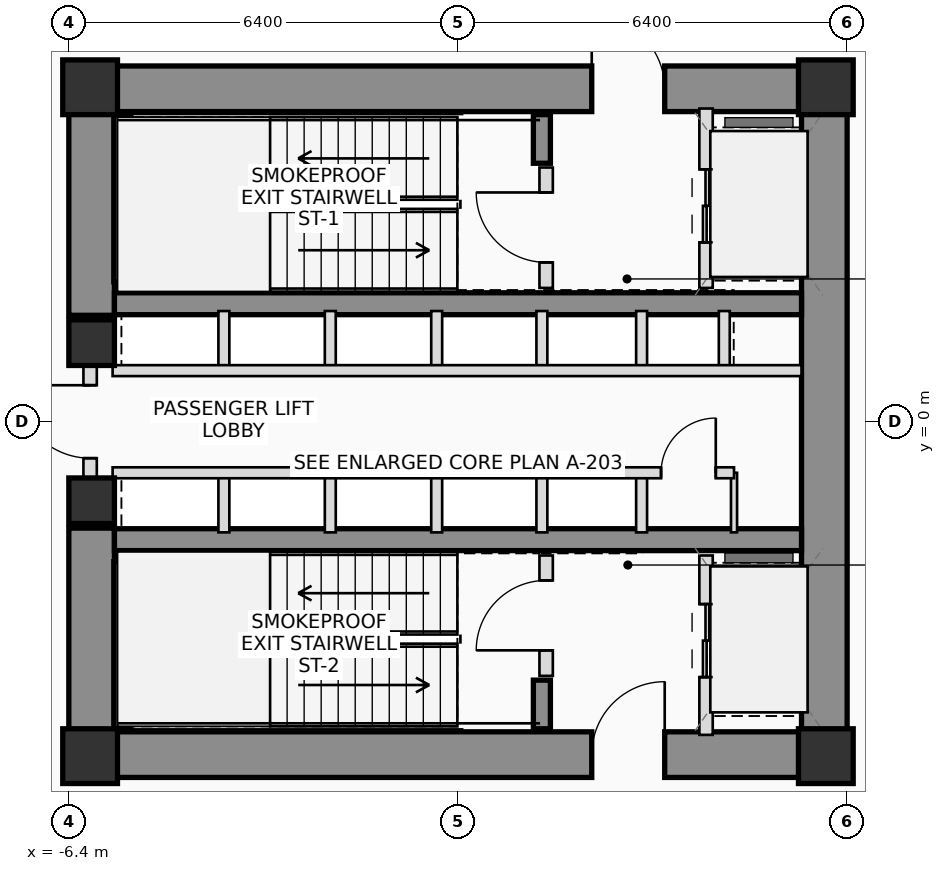
"""IFC4 building model, lengths in metres.
Left out: names, types, materials, properties, quantities, classifications, styles, units other than length and angle.
Written with IfcOpenShell. Run it as: python <this file> out.ifc"""

import sys

from ifc_helpers import new_model, si_unit, direction, frame, frame_2d, origin, origin_2d, place, context, subcontext, project, spatial, rectangle, extrude, source, transform, mapped, element, fill, save


model = new_model("IFC4")
c1 = context("Model", 3, precision=1e-05, world=origin(), true_north=direction((0.0, 1.0)))
c2 = subcontext(c1, "Body", "Model", "MODEL_VIEW")
j1 = project(units=[si_unit("LENGTHUNIT", "METRE"), si_unit("PLANEANGLEUNIT", "RADIAN")], contexts=[c1])
p1 = place(None, origin())
s1 = spatial("IfcSite", under=j1, at=p1, CompositionType="ELEMENT")
p2 = place(p1, origin())
s2 = spatial("IfcBuilding", under=s1, at=p2, CompositionType="ELEMENT")
p3 = place(p2, frame((0.0, 0.0, 4.5)))
s3 = spatial("IfcBuildingStorey", under=s2, at=p3, CompositionType="ELEMENT", Elevation=4.5)
m1 = source(origin(), c2, "Body", "SweptSolid", [
    extrude(rectangle(XDim=0.9, YDim=0.9, at=origin_2d()), origin(), (0.0, 0.0, 1.0), 3.9),
])
for number, where, z_axis, x_axis in (
    (1, (-6.05, -5.5, 0.0), (0.0, 0.0, 1.0), (1.0, 0.0, 0.0)),
    (2, (6.05, -5.5, 0.0), (0.0, 0.0, 1.0), (1.0, 0.0, 0.0)),
    (3, (6.05, 5.5, 0.0), (0.0, 0.0, 1.0), (1.0, 0.0, 0.0)),
    (4, (-6.05, 5.5, 0.0), (0.0, 0.0, 1.0), (1.0, 0.0, 0.0)),
):
    element("IfcColumn", number, at=place(p3, frame(where, z_axis=z_axis, x_axis=x_axis)), inside=s3, PredefinedType="COLUMN", context=c2, shape_type="MappedRepresentation", body=[
        mapped(m1, transform((0.0, 0.0, 0.0), scale=1.0)),
    ])
p4 = place(p3, frame((-6.4, 5.475, 0.0), z_axis=(0.0, 0.0, 1.0), x_axis=(1.0, 0.0, 0.0)))
e5 = element("IfcWall", 5, at=p4, inside=s3, PredefinedType="SHEAR", context=c2, shape_type="SweptSolid", body=[
    extrude(rectangle(XDim=12.8, YDim=0.75, at=frame_2d((6.4, 0.0))), origin(), (0.0, 0.0, 1.0), 3.9),
])
p5 = place(p4, frame((8.6, 0.0, 0.0)))
e6 = element("IfcOpeningElement", 6, at=p5, cuts=e5, PredefinedType="OPENING", context=c2, shape_type="SweptSolid", body=[
    extrude(rectangle(XDim=1.2, YDim=2.2, at=frame_2d((0.6, 1.1))), frame((0.0, 0.385, 0.0), z_axis=(0.0, -1.0, 0.0), x_axis=(1.0, 0.0, 0.0)), (0.0, 0.0, 1.0), 0.77),
])
p6 = place(p3, frame((-6.4, -5.475, 0.0), z_axis=(0.0, 0.0, 1.0), x_axis=(1.0, 0.0, 0.0)))
e7 = element("IfcWall", 7, at=p6, inside=s3, PredefinedType="SHEAR", context=c2, shape_type="SweptSolid", body=[
    extrude(rectangle(XDim=12.8, YDim=0.75, at=frame_2d((6.4, 0.0))), origin(), (0.0, 0.0, 1.0), 3.9),
])
p7 = place(p6, frame((8.6, 0.0, 0.0)))
e8 = element("IfcOpeningElement", 8, at=p7, cuts=e7, PredefinedType="OPENING", context=c2, shape_type="SweptSolid", body=[
    extrude(rectangle(XDim=1.2, YDim=2.2, at=frame_2d((0.6, 1.1))), frame((0.0, 0.385, 0.0), z_axis=(0.0, -1.0, 0.0), x_axis=(1.0, 0.0, 0.0)), (0.0, 0.0, 1.0), 0.77),
])
p8 = place(p3, frame((6.025, -5.1, 0.0), z_axis=(0.0, 0.0, 1.0), x_axis=(0.0, 1.0, 0.0)))
e9 = element("IfcWall", 9, at=p8, inside=s3, PredefinedType="SHEAR", context=c2, shape_type="SweptSolid", body=[
    extrude(rectangle(XDim=10.2, YDim=0.75, at=frame_2d((5.1, 0.0))), origin(), (0.0, 0.0, 1.0), 3.9),
])
for number, where, z_axis, x_axis in (
    (10, (-6.025, -5.1, 0.0), (0.0, 0.0, 1.0), (0.0, 1.0, 0.0)),
    (11, (-6.025, 1.75, 0.0), (0.0, 0.0, 1.0), (0.0, 1.0, 0.0)),
):
    element("IfcWall", number, at=place(p3, frame(where, z_axis=z_axis, x_axis=x_axis)), inside=s3, PredefinedType="SHEAR", context=c2, shape_type="SweptSolid", body=[
        extrude(rectangle(XDim=3.35, YDim=0.75, at=frame_2d((1.675, 0.0))), origin(), (0.0, 0.0, 1.0), 3.9),
    ])
for number, where, z_axis, x_axis in (
    (12, (-5.65, 1.94, 0.0), (0.0, 0.0, 1.0), (1.0, 0.0, 0.0)),
    (13, (-5.65, -1.94, 0.0), (0.0, 0.0, 1.0), (1.0, 0.0, 0.0)),
):
    element("IfcWall", number, at=place(p3, frame(where, z_axis=z_axis, x_axis=x_axis)), inside=s3, PredefinedType="SHEAR", context=c2, shape_type="SweptSolid", body=[
        extrude(rectangle(XDim=11.3, YDim=0.36, at=frame_2d((5.65, 0.0))), origin(), (0.0, 0.0, 1.0), 3.9),
    ])
p9 = place(p3, frame((-5.52, 2.3, 0.0), z_axis=(0.0, 0.0, 1.0), x_axis=(0.0, 1.0, 0.0)))
e14 = element("IfcWall", 14, at=p9, inside=s3, PredefinedType="SHEAR", context=c2, shape_type="SweptSolid", body=[
    extrude(rectangle(XDim=2.75, YDim=0.28, at=frame_2d((1.375, 0.0))), origin(), (0.0, 0.0, 1.0), 3.9),
])
p10 = place(p3, frame((1.38, 4.25, 0.0), z_axis=(0.0, 0.0, 1.0), x_axis=(0.0, 1.0, 0.0)))
e15 = element("IfcWall", 15, at=p10, inside=s3, PredefinedType="SHEAR", context=c2, shape_type="SweptSolid", body=[
    extrude(rectangle(XDim=0.8, YDim=0.28, at=frame_2d((0.4, 0.0))), origin(), (0.0, 0.0, 1.0), 3.9),
])
p11 = place(p3, frame((-5.52, -5.05, 0.0), z_axis=(0.0, 0.0, 1.0), x_axis=(0.0, 1.0, 0.0)))
e16 = element("IfcWall", 16, at=p11, inside=s3, PredefinedType="SHEAR", context=c2, shape_type="SweptSolid", body=[
    extrude(rectangle(XDim=2.75, YDim=0.28, at=frame_2d((1.375, 0.0))), origin(), (0.0, 0.0, 1.0), 3.9),
])
p12 = place(p3, frame((1.38, -5.05, 0.0), z_axis=(0.0, 0.0, 1.0), x_axis=(0.0, 1.0, 0.0)))
e17 = element("IfcWall", 17, at=p12, inside=s3, PredefinedType="SHEAR", context=c2, shape_type="SweptSolid", body=[
    extrude(rectangle(XDim=0.8, YDim=0.28, at=frame_2d((0.4, 0.0))), origin(), (0.0, 0.0, 1.0), 3.9),
])
m2 = source(origin(), c2, "Body", "SweptSolid", [
    extrude(rectangle(XDim=0.75, YDim=0.75, at=origin_2d()), origin(), (0.0, 0.0, 1.0), 3.9),
])
for number, where, z_axis, x_axis in (
    (18, (-6.025, -1.3, 0.0), (0.0, 0.0, 1.0), (1.0, 0.0, 0.0)),
    (19, (-6.025, 1.3, 0.0), (0.0, 0.0, 1.0), (1.0, 0.0, 0.0)),
):
    element("IfcColumn", number, at=place(p3, frame(where, z_axis=z_axis, x_axis=x_axis)), inside=s3, PredefinedType="COLUMN", context=c2, shape_type="MappedRepresentation", body=[
        mapped(m2, transform((0.0, 0.0, 0.0), scale=1.0)),
    ])
p13 = place(p3, frame((-6.05, -0.95, 0.0), z_axis=(0.0, 0.0, 1.0), x_axis=(0.0, 1.0, 0.0)))
e20 = element("IfcWall", 20, at=p13, inside=s3, PredefinedType="PLUMBINGWALL", context=c2, shape_type="SweptSolid", body=[
    extrude(rectangle(XDim=1.9, YDim=0.22, at=frame_2d((0.95, 0.0))), origin(), (0.0, 0.0, 1.0), 2.55),
])
p14 = place(p13, frame((0.35, 0.0, 0.0)))
e21 = element("IfcOpeningElement", 21, at=p14, cuts=e20, PredefinedType="OPENING", context=c2, shape_type="SweptSolid", body=[
    extrude(rectangle(XDim=1.2, YDim=2.2, at=frame_2d((0.6, 1.1))), frame((0.0, 0.12, 0.0), z_axis=(0.0, -1.0, 0.0), x_axis=(1.0, 0.0, 0.0)), (0.0, 0.0, 1.0), 0.24),
])
p15 = place(p3, frame((1.45, 2.2, 0.0), z_axis=(0.0, 0.0, 1.0), x_axis=(0.0, 1.0, 0.0)))
e22 = element("IfcWall", 22, at=p15, inside=s3, PredefinedType="PLUMBINGWALL", context=c2, shape_type="SweptSolid", body=[
    extrude(rectangle(XDim=1.98, YDim=0.22, at=frame_2d((0.99, 0.0))), origin(), (0.0, 0.0, 1.0), 3.57),
])
p16 = place(p15, frame((0.42, 0.0, 0.0)))
e23 = element("IfcOpeningElement", 23, at=p16, cuts=e22, PredefinedType="OPENING", context=c2, shape_type="SweptSolid", body=[
    extrude(rectangle(XDim=1.15, YDim=2.15, at=frame_2d((0.575, 1.075))), frame((0.0, 0.12, 0.0), z_axis=(0.0, -1.0, 0.0), x_axis=(1.0, 0.0, 0.0)), (0.0, 0.0, 1.0), 0.24),
])
p17 = place(p3, frame((4.08, 2.2, 0.0), z_axis=(0.0, 0.0, 1.0), x_axis=(0.0, 1.0, 0.0)))
e24 = element("IfcWall", 24, at=p17, inside=s3, PredefinedType="PLUMBINGWALL", context=c2, shape_type="SweptSolid", body=[
    extrude(rectangle(XDim=2.95, YDim=0.22, at=frame_2d((1.475, 0.0))), origin(), (0.0, 0.0, 1.0), 3.57),
])
p18 = place(p17, frame((0.75, 0.0, 0.0)))
e25 = element("IfcOpeningElement", 25, at=p18, cuts=e24, PredefinedType="OPENING", context=c2, shape_type="SweptSolid", body=[
    extrude(rectangle(XDim=1.2, YDim=2.25, at=frame_2d((0.6, 1.125))), frame((0.0, 0.12, 0.0), z_axis=(0.0, -1.0, 0.0), x_axis=(1.0, 0.0, 0.0)), (0.0, 0.0, 1.0), 0.24),
])
p19 = place(p3, frame((1.45, -4.18, 0.0), z_axis=(0.0, 0.0, 1.0), x_axis=(0.0, 1.0, 0.0)))
e26 = element("IfcWall", 26, at=p19, inside=s3, PredefinedType="PLUMBINGWALL", context=c2, shape_type="SweptSolid", body=[
    extrude(rectangle(XDim=1.98, YDim=0.22, at=frame_2d((0.99, 0.0))), origin(), (0.0, 0.0, 1.0), 3.57),
])
p20 = place(p19, frame((0.42, 0.0, 0.0)))
e27 = element("IfcOpeningElement", 27, at=p20, cuts=e26, PredefinedType="OPENING", context=c2, shape_type="SweptSolid", body=[
    extrude(rectangle(XDim=1.15, YDim=2.15, at=frame_2d((0.575, 1.075))), frame((0.0, 0.12, 0.0), z_axis=(0.0, -1.0, 0.0), x_axis=(1.0, 0.0, 0.0)), (0.0, 0.0, 1.0), 0.24),
])
p21 = place(p3, frame((4.08, -5.15, 0.0), z_axis=(0.0, 0.0, 1.0), x_axis=(0.0, 1.0, 0.0)))
e28 = element("IfcWall", 28, at=p21, inside=s3, PredefinedType="PLUMBINGWALL", context=c2, shape_type="SweptSolid", body=[
    extrude(rectangle(XDim=2.95, YDim=0.22, at=frame_2d((1.475, 0.0))), origin(), (0.0, 0.0, 1.0), 3.57),
])
p22 = place(p21, frame((0.95, 0.0, 0.0)))
e29 = element("IfcOpeningElement", 29, at=p22, cuts=e28, PredefinedType="OPENING", context=c2, shape_type="SweptSolid", body=[
    extrude(rectangle(XDim=1.2, YDim=2.25, at=frame_2d((0.6, 1.125))), frame((0.0, 0.12, 0.0), z_axis=(0.0, -1.0, 0.0), x_axis=(1.0, 0.0, 0.0)), (0.0, 0.0, 1.0), 0.24),
])
for number, where, z_axis, x_axis in (
    (30, (-3.85, 0.84, 0.0), (0.0, 0.0, 1.0), (0.0, 1.0, 0.0)),
    (31, (-3.85, -1.82, 0.0), (0.0, 0.0, 1.0), (0.0, 1.0, 0.0)),
    (32, (-2.1, 0.84, 0.0), (0.0, 0.0, 1.0), (0.0, 1.0, 0.0)),
    (33, (-2.1, -1.82, 0.0), (0.0, 0.0, 1.0), (0.0, 1.0, 0.0)),
    (34, (-0.35, 0.84, 0.0), (0.0, 0.0, 1.0), (0.0, 1.0, 0.0)),
    (35, (-0.35, -1.82, 0.0), (0.0, 0.0, 1.0), (0.0, 1.0, 0.0)),
    (36, (1.38, 0.84, 0.0), (0.0, 0.0, 1.0), (0.0, 1.0, 0.0)),
    (37, (1.38, -1.82, 0.0), (0.0, 0.0, 1.0), (0.0, 1.0, 0.0)),
    (38, (3.02, 0.84, 0.0), (0.0, 0.0, 1.0), (0.0, 1.0, 0.0)),
    (39, (4.38, 0.84, 0.0), (0.0, 0.0, 1.0), (0.0, 1.0, 0.0)),
    (40, (3.02, -1.82, 0.0), (0.0, 0.0, 1.0), (0.0, 1.0, 0.0)),
):
    element("IfcWall", number, at=place(p3, frame(where, z_axis=z_axis, x_axis=x_axis)), inside=s3, PredefinedType="PLUMBINGWALL", context=c2, shape_type="SweptSolid", body=[
        extrude(rectangle(XDim=0.98, YDim=0.18, at=frame_2d((0.49, 0.0))), origin(), (0.0, 0.0, 1.0), 3.57),
    ])
p23 = place(p3, frame((4.54, -1.82, 0.0), z_axis=(0.0, 0.0, 1.0), x_axis=(0.0, 1.0, 0.0)))
e41 = element("IfcWall", 41, at=p23, inside=s3, PredefinedType="PARTITIONING", context=c2, shape_type="SweptSolid", body=[
    extrude(rectangle(XDim=0.98, YDim=0.1, at=frame_2d((0.49, 0.0))), origin(), (0.0, 0.0, 1.0), 3.57),
])
p24 = place(p3, frame((-5.68, 0.84, 0.0), z_axis=(0.0, 0.0, 1.0), x_axis=(1.0, 0.0, 0.0)))
e42 = element("IfcWall", 42, at=p24, inside=s3, PredefinedType="PLUMBINGWALL", context=c2, shape_type="SweptSolid", body=[
    extrude(rectangle(XDim=11.33, YDim=0.18, at=frame_2d((5.665, 0.0))), origin(), (0.0, 0.0, 1.0), 3.57),
])
p25 = place(p3, frame((-5.68, -0.84, 0.0), z_axis=(0.0, 0.0, 1.0), x_axis=(1.0, 0.0, 0.0)))
e43 = element("IfcWall", 43, at=p25, inside=s3, PredefinedType="PLUMBINGWALL", context=c2, shape_type="SweptSolid", body=[
    extrude(rectangle(XDim=10.22, YDim=0.18, at=frame_2d((5.11, 0.0))), origin(), (0.0, 0.0, 1.0), 3.57),
])
p26 = place(p25, frame((9.02, 0.0, 0.0)))
e44 = element("IfcOpeningElement", 44, at=p26, cuts=e43, PredefinedType="OPENING", context=c2, shape_type="SweptSolid", body=[
    extrude(rectangle(XDim=0.9, YDim=2.05, at=frame_2d((0.45, 1.025))), frame((0.0, 0.1, 0.0), z_axis=(0.0, -1.0, 0.0), x_axis=(1.0, 0.0, 0.0)), (0.0, 0.0, 1.0), 0.2),
])
p27 = place(p5, origin())
e45 = element("IfcDoor", 45, at=p27, inside=s3, OperationType="SINGLE_SWING_LEFT", PredefinedType="DOOR", context=c2, shape_type="SweptSolid", body=[
    extrude(rectangle(XDim=1.2, YDim=2.2, at=frame_2d((0.6, 1.1))), frame((0.0, 0.025, 0.0), z_axis=(0.0, -1.0, 0.0), x_axis=(1.0, 0.0, 0.0)), (0.0, 0.0, 1.0), 0.05),
])
fill(e6, e45)
p28 = place(p7, origin())
e46 = element("IfcDoor", 46, at=p28, inside=s3, OperationType="SINGLE_SWING_RIGHT", PredefinedType="DOOR", context=c2, shape_type="SweptSolid", body=[
    extrude(rectangle(XDim=1.2, YDim=2.2, at=frame_2d((0.6, 1.1))), frame((0.0, 0.025, 0.0), z_axis=(0.0, -1.0, 0.0), x_axis=(1.0, 0.0, 0.0)), (0.0, 0.0, 1.0), 0.05),
])
fill(e8, e46)
p29 = place(p14, origin())
e47 = element("IfcDoor", 47, at=p29, inside=s3, OperationType="SINGLE_SWING_RIGHT", PredefinedType="DOOR", context=c2, shape_type="SweptSolid", body=[
    extrude(rectangle(XDim=1.2, YDim=2.2, at=frame_2d((0.6, 1.1))), frame((0.0, 0.025, 0.0), z_axis=(0.0, -1.0, 0.0), x_axis=(1.0, 0.0, 0.0)), (0.0, 0.0, 1.0), 0.05),
])
fill(e21, e47)
p30 = place(p16, origin())
e48 = element("IfcDoor", 48, at=p30, inside=s3, OperationType="SINGLE_SWING_RIGHT", PredefinedType="DOOR", context=c2, shape_type="SweptSolid", body=[
    extrude(rectangle(XDim=1.15, YDim=2.15, at=frame_2d((0.575, 1.075))), frame((0.0, 0.025, 0.0), z_axis=(0.0, -1.0, 0.0), x_axis=(1.0, 0.0, 0.0)), (0.0, 0.0, 1.0), 0.05),
])
fill(e23, e48)
p31 = place(p18, origin())
e49 = element("IfcDoor", 49, at=p31, inside=s3, OperationType="DOUBLE_DOOR_SLIDING", PredefinedType="DOOR", context=c2, shape_type="SweptSolid", body=[
    extrude(rectangle(XDim=1.2, YDim=2.25, at=frame_2d((0.6, 1.125))), frame((0.0, 0.025, 0.0), z_axis=(0.0, -1.0, 0.0), x_axis=(1.0, 0.0, 0.0)), (0.0, 0.0, 1.0), 0.05),
])
fill(e25, e49)
p32 = place(p20, origin())
e50 = element("IfcDoor", 50, at=p32, inside=s3, OperationType="SINGLE_SWING_LEFT", PredefinedType="DOOR", context=c2, shape_type="SweptSolid", body=[
    extrude(rectangle(XDim=1.15, YDim=2.15, at=frame_2d((0.575, 1.075))), frame((0.0, 0.025, 0.0), z_axis=(0.0, -1.0, 0.0), x_axis=(1.0, 0.0, 0.0)), (0.0, 0.0, 1.0), 0.05),
])
fill(e27, e50)
p33 = place(p22, origin())
e51 = element("IfcDoor", 51, at=p33, inside=s3, OperationType="DOUBLE_DOOR_SLIDING", PredefinedType="DOOR", context=c2, shape_type="SweptSolid", body=[
    extrude(rectangle(XDim=1.2, YDim=2.25, at=frame_2d((0.6, 1.125))), frame((0.0, 0.025, 0.0), z_axis=(0.0, -1.0, 0.0), x_axis=(1.0, 0.0, 0.0)), (0.0, 0.0, 1.0), 0.05),
])
fill(e29, e51)
p34 = place(p26, origin())
e52 = element("IfcDoor", 52, at=p34, inside=s3, OperationType="SINGLE_SWING_RIGHT", PredefinedType="DOOR", context=c2, shape_type="SweptSolid", body=[
    extrude(rectangle(XDim=0.9, YDim=2.05, at=frame_2d((0.45, 1.025))), frame((0.0, 0.025, 0.0), z_axis=(0.0, -1.0, 0.0), x_axis=(1.0, 0.0, 0.0)), (0.0, 0.0, 1.0), 0.05),
])
fill(e44, e52)
save(model, sys.argv[1])
